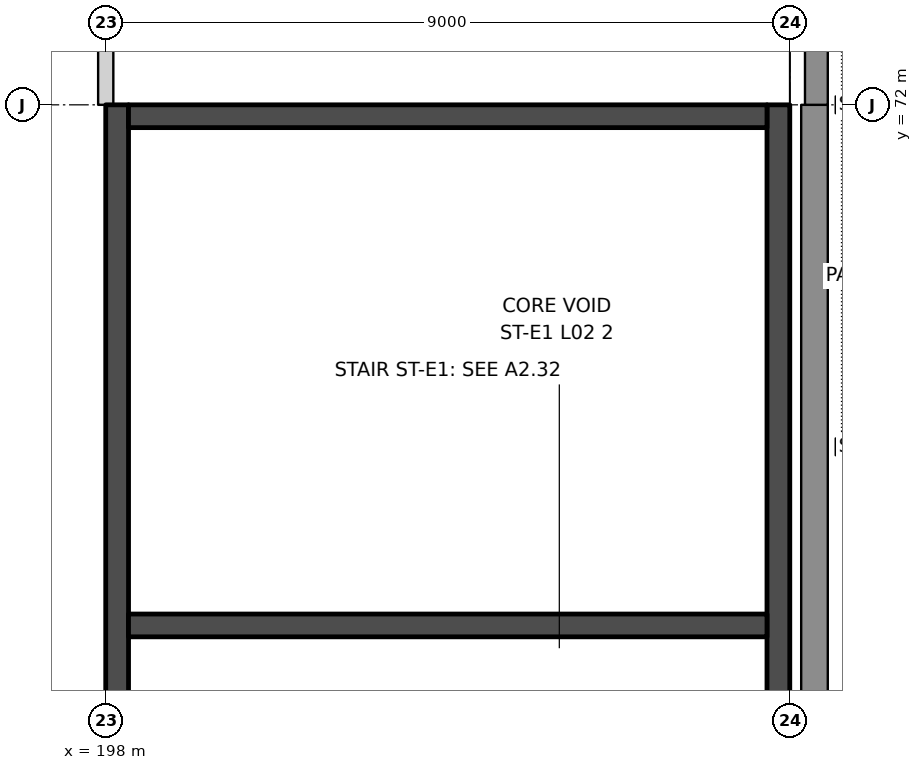
"""IFC4 building model, lengths in metres.
Left out: names, types, materials, properties, quantities, classifications, styles, units other than length and angle.
Written with IfcOpenShell. Run it as: python <this file> out.ifc"""

import sys

from ifc_helpers import new_model, si_unit, direction, frame, frame_2d, origin, place, context, subcontext, project, spatial, rectangle, extrude, element, save


model = new_model("IFC4")
c1 = context("Model", 3, precision=1e-05, world=origin(), true_north=direction((0.0, 1.0)))
c2 = subcontext(c1, "Body", "Model", "MODEL_VIEW")
j1 = project(units=[si_unit("LENGTHUNIT", "METRE"), si_unit("PLANEANGLEUNIT", "RADIAN")], contexts=[c1])
p1 = place(None, origin())
s1 = spatial("IfcSite", under=j1, at=p1, CompositionType="ELEMENT")
p2 = place(p1, origin())
s2 = spatial("IfcBuilding", under=s1, at=p2, CompositionType="ELEMENT")
p3 = place(p2, frame((0.0, 0.0, 11.5)))
s3 = spatial("IfcBuildingStorey", under=s2, at=p3, CompositionType="ELEMENT", Elevation=11.5)
p4 = place(p3, frame((198.0, 72.0, 0.0), z_axis=(0.0, 0.0, 1.0), x_axis=(0.0, 1.0, 0.0)))
e1 = element("IfcWall", 1, at=p4, inside=s3, PredefinedType="PARTITIONING", context=c2, shape_type="SweptSolid", body=[
    extrude(rectangle(XDim=8.6, YDim=0.2, at=frame_2d((4.3, 0.0))), origin(), (0.0, 0.0, 1.0), 9.15),
])
p5 = place(p4, frame((3.4, 0.0, 0.0)))
e2 = element("IfcOpeningElement", 2, at=p5, cuts=e1, PredefinedType="OPENING", context=c2, shape_type="SweptSolid", body=[
    extrude(rectangle(XDim=1.8, YDim=2.1, at=frame_2d((0.9, 1.05))), frame((0.0, 0.11, 0.0), z_axis=(0.0, -1.0, 0.0), x_axis=(1.0, 0.0, 0.0)), (0.0, 0.0, 1.0), 0.22),
])
p6 = place(p3, frame((207.325, 63.0, 0.0), z_axis=(0.0, 0.0, 1.0), x_axis=(0.0, 1.0, 0.0)))
e3 = element("IfcWall", 3, at=p6, inside=s3, PredefinedType="SOLIDWALL", context=c2, shape_type="SweptSolid", body=[
    extrude(rectangle(XDim=9.0, YDim=0.35, at=frame_2d((4.5, 0.0))), origin(), (0.0, 0.0, 1.0), 10.5),
])
p7 = place(p3, frame((207.35, 72.0, 0.0), z_axis=(0.0, 0.0, 1.0), x_axis=(0.0, 1.0, 0.0)))
e4 = element("IfcWall", 4, at=p7, inside=s3, PredefinedType="SOLIDWALL", context=c2, shape_type="SweptSolid", body=[
    extrude(rectangle(XDim=8.55, YDim=0.3, at=frame_2d((4.275, 0.0))), origin(), (0.0, 0.0, 1.0), 10.5),
])
p8 = place(p3, frame((198.15, 54.0, 0.0), z_axis=(0.0, 0.0, 1.0), x_axis=(0.0, 1.0, 0.0)))
e5 = element("IfcWall", 5, at=p8, inside=s3, PredefinedType="SHEAR", context=c2, shape_type="SweptSolid", body=[
    extrude(rectangle(XDim=18.0, YDim=0.3, at=frame_2d((9.0, 0.0))), origin(), (0.0, 0.0, 1.0), 10.5),
])
p9 = place(p8, frame((1.5, 0.0, 0.0)))
e6 = element("IfcOpeningElement", 6, at=p9, cuts=e5, PredefinedType="OPENING", context=c2, shape_type="SweptSolid", body=[
    extrude(rectangle(XDim=1.2, YDim=2.1, at=frame_2d((0.6, 1.05))), frame((0.0, 0.16, 0.0), z_axis=(0.0, -1.0, 0.0), x_axis=(1.0, 0.0, 0.0)), (0.0, 0.0, 1.0), 0.32),
])
p10 = place(p3, frame((206.85, 54.0, 0.0), z_axis=(0.0, 0.0, 1.0), x_axis=(0.0, 1.0, 0.0)))
e7 = element("IfcWall", 7, at=p10, inside=s3, PredefinedType="SHEAR", context=c2, shape_type="SweptSolid", body=[
    extrude(rectangle(XDim=18.0, YDim=0.3, at=frame_2d((9.0, 0.0))), origin(), (0.0, 0.0, 1.0), 10.5),
])
for number, where, z_axis, x_axis in (
    (8, (198.3, 71.85, 0.0), (0.0, 0.0, 1.0), (1.0, 0.0, 0.0)),
    (9, (198.3, 65.15, 0.0), (0.0, 0.0, 1.0), (1.0, 0.0, 0.0)),
):
    element("IfcWall", number, at=place(p3, frame(where, z_axis=z_axis, x_axis=x_axis)), inside=s3, PredefinedType="SHEAR", context=c2, shape_type="SweptSolid", body=[
        extrude(rectangle(XDim=8.4, YDim=0.3, at=frame_2d((4.2, 0.0))), origin(), (0.0, 0.0, 1.0), 10.5),
    ])
save(model, sys.argv[1])
